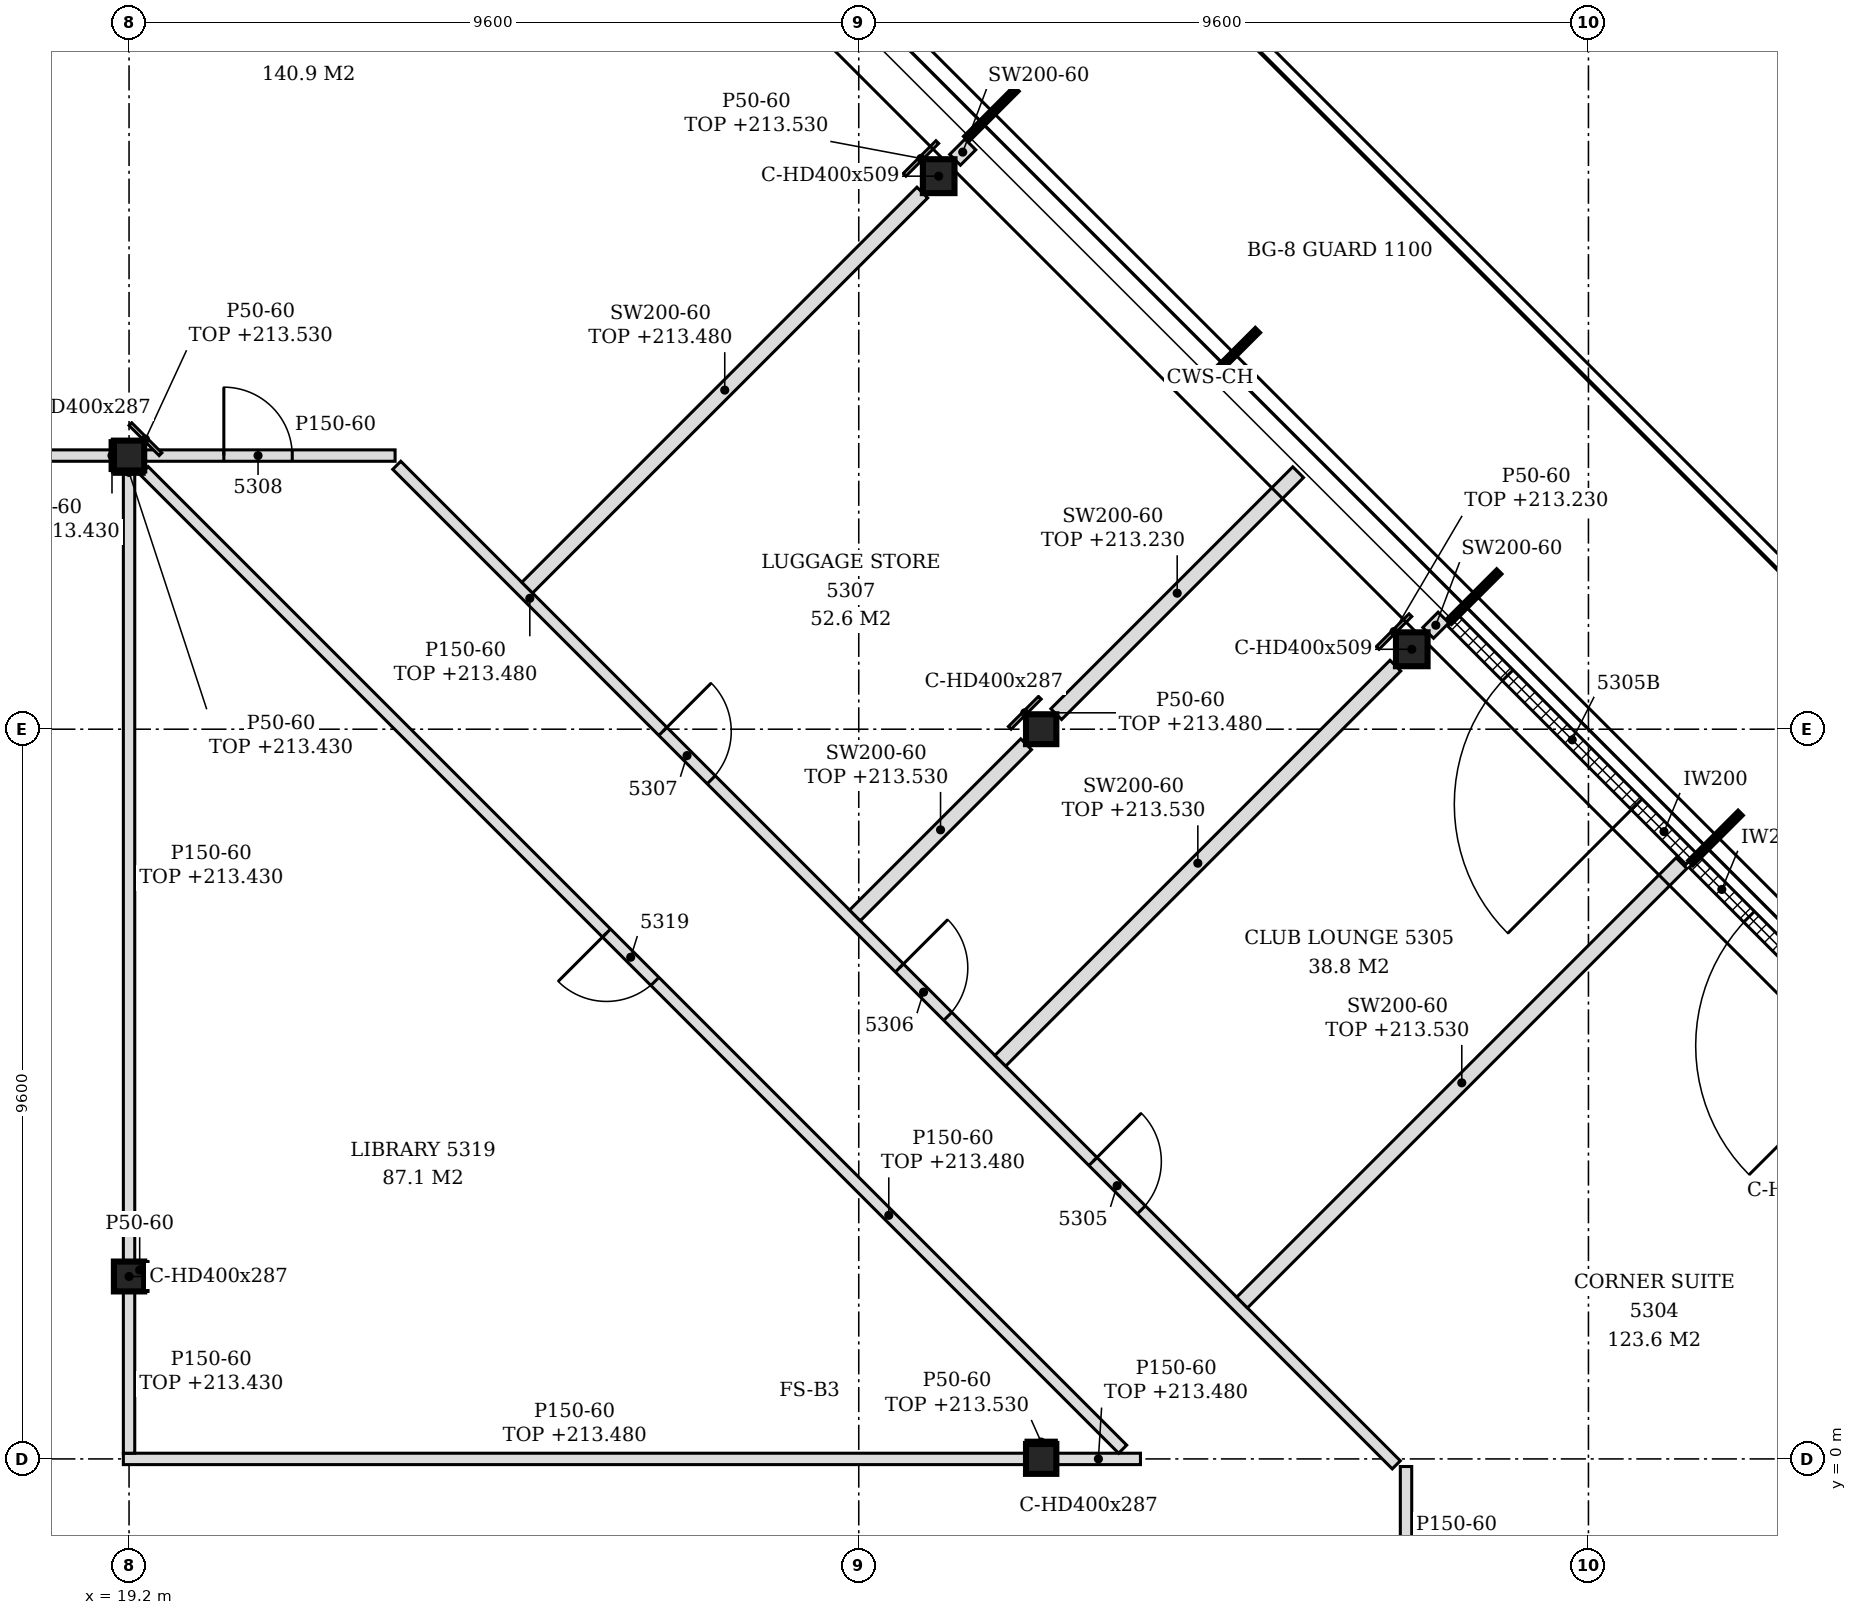
"""IFC4 building model, lengths in metres.
Left out: names, types, materials, properties, quantities, classifications, styles, units other than length and angle.
Written with IfcOpenShell. Run it as: python <this file> out.ifc"""

import sys

from ifc_helpers import new_model, si_unit, direction, frame, frame_2d, origin, origin_2d, place, context, subcontext, project, spatial, polyline, rectangle, i_section, outline, extrude, element, fill, save


model = new_model("IFC4")
c1 = context("Model", 3, precision=1e-05, world=origin(), true_north=direction((0.0, 1.0)))
c2 = subcontext(c1, "Body", "Model", "MODEL_VIEW")
j1 = project(units=[si_unit("LENGTHUNIT", "METRE"), si_unit("PLANEANGLEUNIT", "RADIAN")], contexts=[c1])
p1 = place(None, origin())
s1 = spatial("IfcSite", under=j1, at=p1, CompositionType="ELEMENT")
p2 = place(p1, origin())
s2 = spatial("IfcBuilding", under=s1, at=p2, CompositionType="ELEMENT")
p3 = place(p2, frame((0.0, 0.0, 210.6)))
s3 = spatial("IfcBuildingStorey", under=s2, at=p3, CompositionType="ELEMENT", Elevation=210.6)
for number, where, z_axis, x_axis in (
    (1, (36.076, 10.652, -0.15), (0.0, 0.0, 1.0), (1.0, 0.0, 0.0)),
    (2, (29.852, 16.876, -0.15), (0.0, 0.0, 1.0), (1.0, 0.0, 0.0)),
):
    element("IfcColumn", number, at=place(p3, frame(where, z_axis=z_axis, x_axis=x_axis)), inside=s3, PredefinedType="COLUMN", context=c2, shape_type="SweptSolid", body=[
        extrude(i_section(OverallWidth=0.416, OverallDepth=0.446, WebThickness=0.039, FlangeThickness=0.063, FilletRadius=0.015, at=origin_2d()), origin(), (0.0, 0.0, 1.0), 3.6),
    ])
for number, where, z_axis, x_axis in (
    (3, (19.2, 2.4, -0.15), (0.0, 0.0, 1.0), (1.0, 0.0, 0.0)),
    (4, (19.2, 13.2, -0.15), (0.0, 0.0, 1.0), (1.0, 0.0, 0.0)),
    (5, (31.2, 0.0, -0.15), (0.0, 0.0, 1.0), (1.0, 0.0, 0.0)),
    (6, (31.2, 9.6, -0.15), (0.0, 0.0, 1.0), (1.0, 0.0, 0.0)),
):
    element("IfcColumn", number, at=place(p3, frame(where, z_axis=z_axis, x_axis=x_axis)), inside=s3, PredefinedType="COLUMN", context=c2, shape_type="SweptSolid", body=[
        extrude(i_section(OverallWidth=0.399, OverallDepth=0.393, WebThickness=0.023, FlangeThickness=0.037, FilletRadius=0.015, at=origin_2d()), origin(), (0.0, 0.0, 1.0), 3.6),
    ])
p4 = place(p3, frame((42.922, 4.725, 0.0), z_axis=(0.0, 0.0, 1.0), x_axis=(-0.707079168996, 0.707134392299, 0.0)))
e7 = element("IfcWall", 7, at=p4, inside=s3, PredefinedType="NOTDEFINED", context=c2, shape_type="SweptSolid", body=[
    extrude(rectangle(XDim=4.421, YDim=0.2, at=frame_2d((2.21, 0.0))), origin(), (0.0, 0.0, 1.0), 3.45),
])
p5 = place(p4, frame((1.005, 0.0, 0.0)))
e8 = element("IfcOpeningElement", 8, at=p5, cuts=e7, PredefinedType="OPENING", context=c2, shape_type="SweptSolid", body=[
    extrude(rectangle(XDim=2.4, YDim=2.4, at=frame_2d((1.2, 1.2))), frame((0.0, 0.11, 0.0), z_axis=(0.0, -1.0, 0.0), x_axis=(1.0, 0.0, 0.0)), (0.0, 0.0, 1.0), 0.22),
])
p6 = place(p3, frame((39.753, 7.893, 0.0), z_axis=(0.0, 0.0, 1.0), x_axis=(-0.707106781187, 0.707106781187, 0.0)))
e9 = element("IfcWall", 9, at=p6, inside=s3, PredefinedType="NOTDEFINED", context=c2, shape_type="SweptSolid", body=[
    extrude(rectangle(XDim=4.431, YDim=0.2, at=frame_2d((2.215, 0.0))), origin(), (0.0, 0.0, 1.0), 3.45),
])
p7 = place(p6, frame((1.016, 0.0, 0.0)))
e10 = element("IfcOpeningElement", 10, at=p7, cuts=e9, PredefinedType="OPENING", context=c2, shape_type="SweptSolid", body=[
    extrude(rectangle(XDim=2.4, YDim=2.4, at=frame_2d((1.2, 1.2))), frame((0.0, 0.11, 0.0), z_axis=(0.0, -1.0, 0.0), x_axis=(1.0, 0.0, 0.0)), (0.0, 0.0, 1.0), 0.22),
])
p8 = place(p3, frame((36.0, -1.637, 0.0), z_axis=(0.0, 0.0, 1.0), x_axis=(0.0, 1.0, 0.0)))
e11 = element("IfcWall", 11, at=p8, inside=s3, PredefinedType="PARTITIONING", context=c2, shape_type="SweptSolid", body=[
    extrude(outline(polyline([(0.0, 0.0), (1.537, 0.0), (1.537, 2.88), (1.532, 2.88), (1.53, 3.45), (0.0, 3.45), (0.0, 0.0)])), frame((0.0, 0.075, 0.0), z_axis=(0.0, -1.0, 0.0), x_axis=(1.0, 0.0, 0.0)), (0.0, 0.0, 1.0), 0.15),
])
p9 = place(p3, frame((35.872, -0.078, 0.0), z_axis=(0.0, 0.0, 1.0), x_axis=(-0.707113345155, 0.707100217157, 0.0)))
e12 = element("IfcWall", 12, at=p9, inside=s3, PredefinedType="PARTITIONING", context=c2, shape_type="SweptSolid", body=[
    extrude(rectangle(XDim=18.597, YDim=0.15, at=frame_2d((9.298, 0.0))), origin(), (0.0, 0.0, 1.0), 2.88),
])
p10 = place(p9, frame((4.744, 0.0, 0.0)))
e13 = element("IfcOpeningElement", 13, at=p10, cuts=e12, PredefinedType="OPENING", context=c2, shape_type="SweptSolid", body=[
    extrude(rectangle(XDim=0.9, YDim=2.1, at=frame_2d((0.45, 1.05))), frame((0.0, 0.085, 0.0), z_axis=(0.0, -1.0, 0.0), x_axis=(1.0, 0.0, 0.0)), (0.0, 0.0, 1.0), 0.17),
])
p11 = place(p9, frame((8.345, 0.0, 0.0)))
e14 = element("IfcOpeningElement", 14, at=p11, cuts=e12, PredefinedType="OPENING", context=c2, shape_type="SweptSolid", body=[
    extrude(rectangle(XDim=0.9, YDim=2.1, at=frame_2d((0.45, 1.05))), frame((0.0, 0.085, 0.0), z_axis=(0.0, -1.0, 0.0), x_axis=(1.0, 0.0, 0.0)), (0.0, 0.0, 1.0), 0.17),
])
p12 = place(p9, frame((12.746, 0.0, 0.0)))
e15 = element("IfcOpeningElement", 15, at=p12, cuts=e12, PredefinedType="OPENING", context=c2, shape_type="SweptSolid", body=[
    extrude(rectangle(XDim=0.9, YDim=2.1, at=frame_2d((0.45, 1.05))), frame((0.0, 0.085, 0.0), z_axis=(0.0, -1.0, 0.0), x_axis=(1.0, 0.0, 0.0)), (0.0, 0.0, 1.0), 0.17),
])
p13 = place(p3, frame((19.125, 0.0, 0.0), z_axis=(0.0, 0.0, 1.0), x_axis=(1.0, 0.0, 0.0)))
e16 = element("IfcWall", 16, at=p13, inside=s3, PredefinedType="PARTITIONING", context=c2, shape_type="SweptSolid", body=[
    extrude(outline(polyline([(0.0, 0.0), (11.875, 0.0), (11.875, 2.88), (0.225, 2.88), (0.223, 2.83), (0.0, 2.83), (0.0, 0.0)])), frame((0.0, 0.075, 0.0), z_axis=(0.0, -1.0, 0.0), x_axis=(1.0, 0.0, 0.0)), (0.0, 0.0, 1.0), 0.15),
])
p14 = place(p3, frame((31.399, 0.0, 0.0), z_axis=(0.0, 0.0, 1.0), x_axis=(1.0, 0.0, 0.0)))
e17 = element("IfcWall", 17, at=p14, inside=s3, PredefinedType="PARTITIONING", context=c2, shape_type="SweptSolid", body=[
    extrude(rectangle(XDim=1.107, YDim=0.15, at=frame_2d((0.553, 0.0))), origin(), (0.0, 0.0, 1.0), 2.88),
])
p15 = place(p3, frame((19.2, 0.075, 0.0), z_axis=(0.0, 0.0, 1.0), x_axis=(0.0, 1.0, 0.0)))
e18 = element("IfcWall", 18, at=p15, inside=s3, PredefinedType="PARTITIONING", context=c2, shape_type="SweptSolid", body=[
    extrude(rectangle(XDim=2.129, YDim=0.15, at=frame_2d((1.064, 0.0))), origin(), (0.0, 0.0, 1.0), 2.83),
])
p16 = place(p3, frame((32.272, 0.128, 0.0), z_axis=(0.0, 0.0, 1.0), x_axis=(-0.707106781187, 0.707106781187, 0.0)))
e19 = element("IfcWall", 19, at=p16, inside=s3, PredefinedType="PARTITIONING", context=c2, shape_type="SweptSolid", body=[
    extrude(rectangle(XDim=18.207, YDim=0.15, at=frame_2d((9.103, 0.0))), origin(), (0.0, 0.0, 1.0), 2.88),
])
p17 = place(p16, frame((8.703, 0.0, 0.0)))
e20 = element("IfcOpeningElement", 20, at=p17, cuts=e19, PredefinedType="OPENING", context=c2, shape_type="SweptSolid", body=[
    extrude(rectangle(XDim=0.9, YDim=2.1, at=frame_2d((0.45, 1.05))), frame((0.0, 0.085, 0.0), z_axis=(0.0, -1.0, 0.0), x_axis=(1.0, 0.0, 0.0)), (0.0, 0.0, 1.0), 0.17),
])
p18 = place(p3, frame((33.843, 2.057, 0.0), z_axis=(0.0, 0.0, 1.0), x_axis=(0.70709185088, 0.707121711178, 0.0)))
e21 = element("IfcWall", 21, at=p18, inside=s3, PredefinedType="PARTITIONING", context=c2, shape_type="SweptSolid", body=[
    extrude(rectangle(XDim=8.176, YDim=0.2, at=frame_2d((4.088, 0.0))), origin(), (0.0, 0.0, 1.0), 2.93),
])
p19 = place(p3, frame((19.2, 2.596, 0.0), z_axis=(0.0, 0.0, 1.0), x_axis=(0.0, 1.0, 0.0)))
e22 = element("IfcWall", 22, at=p19, inside=s3, PredefinedType="PARTITIONING", context=c2, shape_type="SweptSolid", body=[
    extrude(rectangle(XDim=10.407, YDim=0.15, at=frame_2d((5.204, 0.0))), origin(), (0.0, 0.0, 1.0), 2.83),
])
p20 = place(p3, frame((30.662, 5.238, 0.0), z_axis=(0.0, 0.0, 1.0), x_axis=(0.707106781187, 0.707106781187, 0.0)))
e23 = element("IfcWall", 23, at=p20, inside=s3, PredefinedType="PARTITIONING", context=c2, shape_type="SweptSolid", body=[
    extrude(rectangle(XDim=7.351, YDim=0.2, at=frame_2d((3.676, 0.0))), origin(), (0.0, 0.0, 1.0), 2.93),
])
p21 = place(p3, frame((28.75, 7.15, 0.0), z_axis=(0.0, 0.0, 1.0), x_axis=(0.7070684525, 0.707145107796, 0.0)))
e24 = element("IfcWall", 24, at=p21, inside=s3, PredefinedType="PARTITIONING", context=c2, shape_type="SweptSolid", body=[
    extrude(rectangle(XDim=3.185, YDim=0.2, at=frame_2d((1.592, 0.0))), origin(), (0.0, 0.0, 1.0), 2.93),
])
p22 = place(p3, frame((31.398, 9.798, 0.0), z_axis=(0.0, 0.0, 1.0), x_axis=(0.707133900936, 0.707079660397, 0.0)))
e25 = element("IfcWall", 25, at=p22, inside=s3, PredefinedType="PARTITIONING", context=c2, shape_type="SweptSolid", body=[
    extrude(rectangle(XDim=4.501, YDim=0.2, at=frame_2d((2.25, 0.0))), origin(), (0.0, 0.0, 1.0), 2.63),
])
p23 = place(p3, frame((36.291, 10.867, 0.0), z_axis=(0.0, 0.0, 1.0), x_axis=(0.707534423513, 0.706678880075, 0.0)))
e26 = element("IfcWall", 26, at=p23, inside=s3, PredefinedType="PARTITIONING", context=c2, shape_type="SweptSolid", body=[
    extrude(rectangle(XDim=0.285, YDim=0.2, at=frame_2d((0.143, 0.0))), origin(), (0.0, 0.0, 1.0), 3.45),
])
p24 = place(p3, frame((24.438, 11.462, 0.0), z_axis=(0.0, 0.0, 1.0), x_axis=(0.707090175614, 0.707123386369, 0.0)))
e27 = element("IfcWall", 27, at=p24, inside=s3, PredefinedType="PARTITIONING", context=c2, shape_type="SweptSolid", body=[
    extrude(rectangle(XDim=7.351, YDim=0.2, at=frame_2d((3.676, 0.0))), origin(), (0.0, 0.0, 1.0), 2.88),
])
p25 = place(p3, frame((7.399, 13.2, 0.0), z_axis=(0.0, 0.0, 1.0), x_axis=(1.0, 0.0, 0.0)))
e28 = element("IfcWall", 28, at=p25, inside=s3, PredefinedType="PARTITIONING", context=c2, shape_type="SweptSolid", body=[
    extrude(rectangle(XDim=11.601, YDim=0.15, at=frame_2d((5.801, 0.0))), origin(), (0.0, 0.0, 1.0), 2.83),
])
p26 = place(p3, frame((19.399, 13.2, 0.0), z_axis=(0.0, 0.0, 1.0), x_axis=(1.0, 0.0, 0.0)))
e29 = element("IfcWall", 29, at=p26, inside=s3, PredefinedType="PARTITIONING", context=c2, shape_type="SweptSolid", body=[
    extrude(rectangle(XDim=3.301, YDim=0.15, at=frame_2d((1.65, 0.0))), origin(), (0.0, 0.0, 1.0), 3.45),
])
p27 = place(p26, frame((1.048, 0.0, 0.0)))
e30 = element("IfcOpeningElement", 30, at=p27, cuts=e29, PredefinedType="OPENING", context=c2, shape_type="SweptSolid", body=[
    extrude(rectangle(XDim=0.9, YDim=2.1, at=frame_2d((0.45, 1.05))), frame((0.0, 0.085, 0.0), z_axis=(0.0, -1.0, 0.0), x_axis=(1.0, 0.0, 0.0)), (0.0, 0.0, 1.0), 0.17),
])
p28 = place(p3, frame((30.067, 17.091, 0.0), z_axis=(0.0, 0.0, 1.0), x_axis=(0.707106781187, 0.707106781187, 0.0)))
e31 = element("IfcWall", 31, at=p28, inside=s3, PredefinedType="PARTITIONING", context=c2, shape_type="SweptSolid", body=[
    extrude(rectangle(XDim=0.285, YDim=0.2, at=frame_2d((0.143, 0.0))), origin(), (0.0, 0.0, 1.0), 3.45),
])
p29 = place(p3, frame((31.0, 0.221, 0.0), z_axis=(0.0, 0.0, 1.0), x_axis=(1.0, 0.0, 0.0)))
e32 = element("IfcWall", 32, at=p29, inside=s3, PredefinedType="PARTITIONING", context=c2, shape_type="SweptSolid", body=[
    extrude(rectangle(XDim=0.399, YDim=0.05, at=frame_2d((0.199, 0.0))), origin(), (0.0, 0.0, 1.0), 2.93),
])
p30 = place(p3, frame((19.425, 2.204, 0.0), z_axis=(0.0, 0.0, 1.0), x_axis=(0.0, 1.0, 0.0)))
e33 = element("IfcWall", 33, at=p30, inside=s3, PredefinedType="PARTITIONING", context=c2, shape_type="SweptSolid", body=[
    extrude(rectangle(XDim=0.393, YDim=0.05, at=frame_2d((0.196, 0.0))), origin(), (0.0, 0.0, 1.0), 3.45),
])
p31 = place(p3, frame((18.976, 13.003, 0.0), z_axis=(0.0, 0.0, 1.0), x_axis=(0.0, 1.0, 0.0)))
e34 = element("IfcWall", 34, at=p31, inside=s3, PredefinedType="PARTITIONING", context=c2, shape_type="SweptSolid", body=[
    extrude(rectangle(XDim=0.393, YDim=0.05, at=frame_2d((0.197, 0.0))), origin(), (0.0, 0.0, 1.0), 2.83),
])
p32 = place(p3, frame((19.614, 13.218, 0.0), z_axis=(0.0, 0.0, 1.0), x_axis=(-0.707106781187, 0.707106781187, 0.0)))
e35 = element("IfcWall", 35, at=p32, inside=s3, PredefinedType="PARTITIONING", context=c2, shape_type="SweptSolid", body=[
    extrude(rectangle(XDim=0.56, YDim=0.05, at=frame_2d((0.28, 0.0))), origin(), (0.0, 0.0, 1.0), 2.93),
])
p33 = place(p3, frame((35.627, 10.669, 0.0), z_axis=(0.0, 0.0, 1.0), x_axis=(0.707307009627, 0.706906496032, 0.0)))
e36 = element("IfcWall", 36, at=p33, inside=s3, PredefinedType="PARTITIONING", context=c2, shape_type="SweptSolid", body=[
    extrude(rectangle(XDim=0.61, YDim=0.05, at=frame_2d((0.305, 0.0))), origin(), (0.0, 0.0, 1.0), 2.63),
])
p34 = place(p3, frame((30.786, 9.618, 0.0), z_axis=(0.0, 0.0, 1.0), x_axis=(0.707106781187, 0.707106781187, 0.0)))
e37 = element("IfcWall", 37, at=p34, inside=s3, PredefinedType="PARTITIONING", context=c2, shape_type="SweptSolid", body=[
    extrude(rectangle(XDim=0.56, YDim=0.05, at=frame_2d((0.28, 0.0))), origin(), (0.0, 0.0, 1.0), 2.88),
])
p35 = place(p3, frame((29.403, 16.893, 0.0), z_axis=(0.0, 0.0, 1.0), x_axis=(0.706906496032, 0.707307009627, 0.0)))
e38 = element("IfcWall", 38, at=p35, inside=s3, PredefinedType="PARTITIONING", context=c2, shape_type="SweptSolid", body=[
    extrude(rectangle(XDim=0.61, YDim=0.05, at=frame_2d((0.305, 0.0))), origin(), (0.0, 0.0, 1.0), 2.93),
])
p36 = place(p3, frame((19.0, 12.979, 0.0), z_axis=(0.0, 0.0, 1.0), x_axis=(1.0, 0.0, 0.0)))
e39 = element("IfcWall", 39, at=p36, inside=s3, PredefinedType="PARTITIONING", context=c2, shape_type="SweptSolid", body=[
    extrude(rectangle(XDim=0.399, YDim=0.05, at=frame_2d((0.199, 0.0))), origin(), (0.0, 0.0, 1.0), 2.83),
])
p37 = place(p5, origin())
e40 = element("IfcDoor", 40, at=p37, inside=s3, OperationType="SINGLE_SWING_LEFT", PredefinedType="DOOR", context=c2, shape_type="SweptSolid", body=[
    extrude(rectangle(XDim=2.4, YDim=2.4, at=frame_2d((1.2, 1.2))), frame((0.0, 0.025, 0.0), z_axis=(0.0, -1.0, 0.0), x_axis=(1.0, 0.0, 0.0)), (0.0, 0.0, 1.0), 0.05),
])
fill(e8, e40)
p38 = place(p7, origin())
e41 = element("IfcDoor", 41, at=p38, inside=s3, OperationType="SINGLE_SWING_LEFT", PredefinedType="DOOR", context=c2, shape_type="SweptSolid", body=[
    extrude(rectangle(XDim=2.4, YDim=2.4, at=frame_2d((1.2, 1.2))), frame((0.0, 0.025, 0.0), z_axis=(0.0, -1.0, 0.0), x_axis=(1.0, 0.0, 0.0)), (0.0, 0.0, 1.0), 0.05),
])
fill(e10, e41)
p39 = place(p10, frame((0.9, 0.0, 0.0), z_axis=(0.0, 0.0, 1.0), x_axis=(-1.0, 0.0, 0.0)))
e42 = element("IfcDoor", 42, at=p39, inside=s3, OperationType="SINGLE_SWING_LEFT", PredefinedType="DOOR", context=c2, shape_type="SweptSolid", body=[
    extrude(rectangle(XDim=0.9, YDim=2.1, at=frame_2d((0.45, 1.05))), frame((0.0, 0.025, 0.0), z_axis=(0.0, -1.0, 0.0), x_axis=(1.0, 0.0, 0.0)), (0.0, 0.0, 1.0), 0.05),
])
fill(e13, e42)
p40 = place(p11, frame((0.9, 0.0, 0.0), z_axis=(0.0, 0.0, 1.0), x_axis=(-1.0, 0.0, 0.0)))
e43 = element("IfcDoor", 43, at=p40, inside=s3, OperationType="SINGLE_SWING_LEFT", PredefinedType="DOOR", context=c2, shape_type="SweptSolid", body=[
    extrude(rectangle(XDim=0.9, YDim=2.1, at=frame_2d((0.45, 1.05))), frame((0.0, 0.025, 0.0), z_axis=(0.0, -1.0, 0.0), x_axis=(1.0, 0.0, 0.0)), (0.0, 0.0, 1.0), 0.05),
])
fill(e14, e43)
p41 = place(p12, frame((0.9, 0.0, 0.0), z_axis=(0.0, 0.0, 1.0), x_axis=(-1.0, 0.0, 0.0)))
e44 = element("IfcDoor", 44, at=p41, inside=s3, OperationType="SINGLE_SWING_LEFT", PredefinedType="DOOR", context=c2, shape_type="SweptSolid", body=[
    extrude(rectangle(XDim=0.9, YDim=2.1, at=frame_2d((0.45, 1.05))), frame((0.0, 0.025, 0.0), z_axis=(0.0, -1.0, 0.0), x_axis=(1.0, 0.0, 0.0)), (0.0, 0.0, 1.0), 0.05),
])
fill(e15, e44)
p42 = place(p27, origin())
e45 = element("IfcDoor", 45, at=p42, inside=s3, OperationType="SINGLE_SWING_LEFT", PredefinedType="DOOR", context=c2, shape_type="SweptSolid", body=[
    extrude(rectangle(XDim=0.9, YDim=2.1, at=frame_2d((0.45, 1.05))), frame((0.0, 0.025, 0.0), z_axis=(0.0, -1.0, 0.0), x_axis=(1.0, 0.0, 0.0)), (0.0, 0.0, 1.0), 0.05),
])
fill(e30, e45)
p43 = place(p17, origin())
e46 = element("IfcDoor", 46, at=p43, inside=s3, OperationType="SINGLE_SWING_RIGHT", PredefinedType="DOOR", context=c2, shape_type="SweptSolid", body=[
    extrude(rectangle(XDim=0.9, YDim=2.1, at=frame_2d((0.45, 1.05))), frame((0.0, 0.025, 0.0), z_axis=(0.0, -1.0, 0.0), x_axis=(1.0, 0.0, 0.0)), (0.0, 0.0, 1.0), 0.05),
])
fill(e20, e46)
save(model, sys.argv[1])
